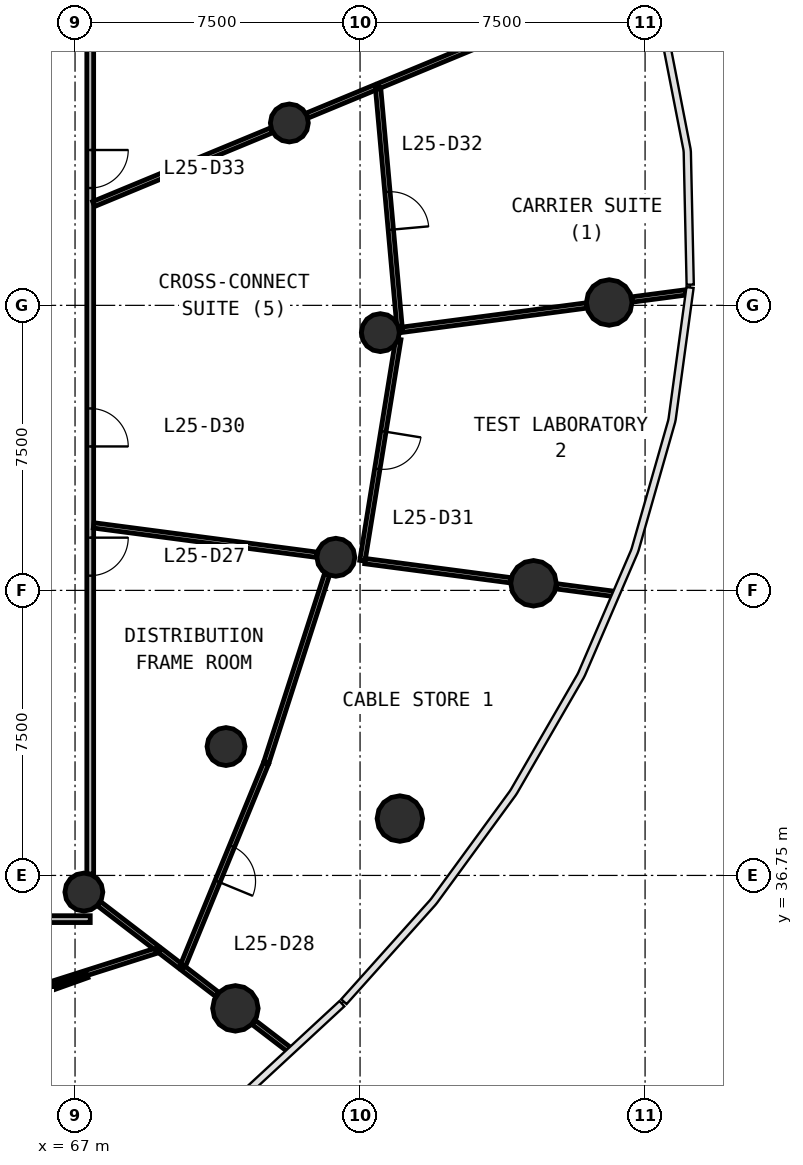
"""IFC4 building model, lengths in metres.
Left out: names, types, materials, properties, quantities, classifications, styles, units other than length and angle.
Written with IfcOpenShell. Run it as: python <this file> out.ifc"""

import sys

from ifc_helpers import new_model, si_unit, direction, frame, frame_2d, origin, origin_2d, place, context, subcontext, project, spatial, rectangle, circle, extrude, source, transform, mapped, element, fill, save


model = new_model("IFC4")
c1 = context("Model", 3, precision=1e-05, world=origin(), true_north=direction((0.0, 1.0)))
c2 = subcontext(c1, "Body", "Model", "MODEL_VIEW")
j1 = project(units=[si_unit("LENGTHUNIT", "METRE"), si_unit("PLANEANGLEUNIT", "RADIAN")], contexts=[c1])
p1 = place(None, origin())
s1 = spatial("IfcSite", under=j1, at=p1, CompositionType="ELEMENT")
p2 = place(p1, origin())
s2 = spatial("IfcBuilding", under=s1, at=p2, CompositionType="ELEMENT")
p3 = place(p2, frame((0.0, 0.0, 108.5)))
s3 = spatial("IfcBuildingStorey", under=s2, at=p3, CompositionType="ELEMENT", Elevation=108.5)
m1 = source(origin(), c2, "Body", "SweptSolid", [
    extrude(circle(Radius=0.6, at=origin_2d()), origin(), (0.0, 0.0, 1.0), 4.1),
])
for number, where, z_axis, x_axis in (
    (1, (81.056, 51.825, 0.0), (0.0, 0.0, 1.0), (1.0, 0.0, 0.0)),
    (2, (71.22, 33.252, 0.0), (0.0, 0.0, 1.0), (1.0, 0.0, 0.0)),
    (3, (75.548, 38.246, 0.0), (0.0, 0.0, 1.0), (1.0, 0.0, 0.0)),
    (4, (79.064, 44.437, 0.0), (0.0, 0.0, 1.0), (1.0, 0.0, 0.0)),
):
    element("IfcColumn", number, at=place(p3, frame(where, z_axis=z_axis, x_axis=x_axis)), inside=s3, PredefinedType="COLUMN", context=c2, shape_type="MappedRepresentation", body=[
        mapped(m1, transform((0.0, 0.0, 0.0), scale=1.0)),
    ])
m2 = source(origin(), c2, "Body", "SweptSolid", [
    extrude(circle(Radius=0.5, at=origin_2d()), origin(), (0.0, 0.0, 1.0), 4.1),
])
for number, where, z_axis, x_axis in (
    (5, (75.034, 51.032, 0.0), (0.0, 0.0, 1.0), (1.0, 0.0, 0.0)),
    (6, (72.639, 56.549, 0.0), (0.0, 0.0, 1.0), (1.0, 0.0, 0.0)),
    (7, (67.232, 36.312, 0.0), (0.0, 0.0, 1.0), (1.0, 0.0, 0.0)),
    (8, (70.972, 40.141, 0.0), (0.0, 0.0, 1.0), (1.0, 0.0, 0.0)),
    (9, (73.863, 45.122, 0.0), (0.0, 0.0, 1.0), (1.0, 0.0, 0.0)),
):
    element("IfcColumn", number, at=place(p3, frame(where, z_axis=z_axis, x_axis=x_axis)), inside=s3, PredefinedType="COLUMN", context=c2, shape_type="MappedRepresentation", body=[
        mapped(m2, transform((0.0, 0.0, 0.0), scale=1.0)),
    ])
p4 = place(p3, frame((67.4, 35.6, 0.0), z_axis=(0.0, 0.0, 1.0), x_axis=(-1.0, 0.0, 0.0)))
e10 = element("IfcWall", 10, at=p4, inside=s3, PredefinedType="PARTITIONING", context=c2, shape_type="SweptSolid", body=[
    extrude(rectangle(XDim=30.8, YDim=0.18, at=frame_2d((15.4, 0.0))), origin(), (0.0, 0.0, 1.0), 2.9),
])
p5 = place(p4, frame((9.05, 0.0, 0.0)))
e11 = element("IfcOpeningElement", 11, at=p5, cuts=e10, PredefinedType="OPENING", context=c2, shape_type="SweptSolid", body=[
    extrude(rectangle(XDim=0.9, YDim=2.1, at=frame_2d((0.45, 1.05))), frame((0.0, 0.1, 0.0), z_axis=(0.0, -1.0, 0.0), x_axis=(1.0, 0.0, 0.0)), (0.0, 0.0, 1.0), 0.2),
])
p6 = place(p4, frame((6.05, 0.0, 0.0)))
e12 = element("IfcOpeningElement", 12, at=p6, cuts=e10, PredefinedType="OPENING", context=c2, shape_type="SweptSolid", body=[
    extrude(rectangle(XDim=0.9, YDim=2.1, at=frame_2d((0.45, 1.05))), frame((0.0, 0.1, 0.0), z_axis=(0.0, -1.0, 0.0), x_axis=(1.0, 0.0, 0.0)), (0.0, 0.0, 1.0), 0.2),
])
p7 = place(p4, frame((2.45, 0.0, 0.0)))
e13 = element("IfcOpeningElement", 13, at=p7, cuts=e10, PredefinedType="OPENING", context=c2, shape_type="SweptSolid", body=[
    extrude(rectangle(XDim=0.9, YDim=2.1, at=frame_2d((0.45, 1.05))), frame((0.0, 0.1, 0.0), z_axis=(0.0, -1.0, 0.0), x_axis=(1.0, 0.0, 0.0)), (0.0, 0.0, 1.0), 0.2),
])
p8 = place(p4, frame((20.95, 0.0, 0.0)))
e14 = element("IfcOpeningElement", 14, at=p8, cuts=e10, PredefinedType="OPENING", context=c2, shape_type="SweptSolid", body=[
    extrude(rectangle(XDim=1.0, YDim=2.1, at=frame_2d((0.5, 1.05))), frame((0.0, 0.1, 0.0), z_axis=(0.0, -1.0, 0.0), x_axis=(1.0, 0.0, 0.0)), (0.0, 0.0, 1.0), 0.2),
])
p9 = place(p4, frame((14.95, 0.0, 0.0)))
e15 = element("IfcOpeningElement", 15, at=p9, cuts=e10, PredefinedType="OPENING", context=c2, shape_type="SweptSolid", body=[
    extrude(rectangle(XDim=1.0, YDim=2.1, at=frame_2d((0.5, 1.05))), frame((0.0, 0.1, 0.0), z_axis=(0.0, -1.0, 0.0), x_axis=(1.0, 0.0, 0.0)), (0.0, 0.0, 1.0), 0.2),
])
p10 = place(p4, frame((12.55, 0.0, 0.0)))
e16 = element("IfcOpeningElement", 16, at=p10, cuts=e10, PredefinedType="OPENING", context=c2, shape_type="SweptSolid", body=[
    extrude(rectangle(XDim=1.0, YDim=2.1, at=frame_2d((0.5, 1.05))), frame((0.0, 0.1, 0.0), z_axis=(0.0, -1.0, 0.0), x_axis=(1.0, 0.0, 0.0)), (0.0, 0.0, 1.0), 0.2),
])
p11 = place(p3, frame((67.4, 60.37, 0.0), z_axis=(0.0, 0.0, 1.0), x_axis=(0.0, -1.0, 0.0)))
e17 = element("IfcWall", 17, at=p11, inside=s3, PredefinedType="PARTITIONING", context=c2, shape_type="SweptSolid", body=[
    extrude(rectangle(XDim=23.583, YDim=0.18, at=frame_2d((11.791, 0.0))), origin(), (0.0, 0.0, 1.0), 2.9),
])
p12 = place(p11, frame((14.732, 0.0, 0.0)))
e18 = element("IfcOpeningElement", 18, at=p12, cuts=e17, PredefinedType="OPENING", context=c2, shape_type="SweptSolid", body=[
    extrude(rectangle(XDim=1.0, YDim=2.1, at=frame_2d((0.5, 1.05))), frame((0.0, 0.1, 0.0), z_axis=(0.0, -1.0, 0.0), x_axis=(1.0, 0.0, 0.0)), (0.0, 0.0, 1.0), 0.2),
])
p13 = place(p11, frame((11.333, 0.0, 0.0)))
e19 = element("IfcOpeningElement", 19, at=p13, cuts=e17, PredefinedType="OPENING", context=c2, shape_type="SweptSolid", body=[
    extrude(rectangle(XDim=1.0, YDim=2.1, at=frame_2d((0.5, 1.05))), frame((0.0, 0.1, 0.0), z_axis=(0.0, -1.0, 0.0), x_axis=(1.0, 0.0, 0.0)), (0.0, 0.0, 1.0), 0.2),
])
p14 = place(p11, frame((4.532, 0.0, 0.0)))
e20 = element("IfcOpeningElement", 20, at=p14, cuts=e17, PredefinedType="OPENING", context=c2, shape_type="SweptSolid", body=[
    extrude(rectangle(XDim=1.0, YDim=2.1, at=frame_2d((0.5, 1.05))), frame((0.0, 0.1, 0.0), z_axis=(0.0, -1.0, 0.0), x_axis=(1.0, 0.0, 0.0)), (0.0, 0.0, 1.0), 0.2),
])
p15 = place(p3, frame((74.97, 57.515, 0.0), z_axis=(0.0, 0.0, 1.0), x_axis=(0.089462467016, -0.995990194227, 0.0)))
e21 = element("IfcWall", 21, at=p15, inside=s3, PredefinedType="PARTITIONING", context=c2, shape_type="SweptSolid", body=[
    extrude(rectangle(XDim=6.44, YDim=0.14, at=frame_2d((3.22, 0.0))), origin(), (0.0, 0.0, 1.0), 2.9),
])
p16 = place(p15, frame((2.791, 0.0, 0.0)))
e22 = element("IfcOpeningElement", 22, at=p16, cuts=e21, PredefinedType="OPENING", context=c2, shape_type="SweptSolid", body=[
    extrude(rectangle(XDim=1.0, YDim=2.1, at=frame_2d((0.5, 1.05))), frame((0.0, 0.08, 0.0), z_axis=(0.0, -1.0, 0.0), x_axis=(1.0, 0.0, 0.0)), (0.0, 0.0, 1.0), 0.16),
])
p17 = place(p3, frame((67.49, 45.961, 0.0), z_axis=(0.0, 0.0, 1.0), x_axis=(0.991445034615, -0.130524876315, 0.0)))
e23 = element("IfcWall", 23, at=p17, inside=s3, PredefinedType="PARTITIONING", context=c2, shape_type="SweptSolid", body=[
    extrude(rectangle(XDim=5.924, YDim=0.14, at=frame_2d((2.962, 0.0))), origin(), (0.0, 0.0, 1.0), 2.9),
])
p18 = place(p3, frame((63.525, 32.98, 0.0), z_axis=(0.0, 0.0, 1.0), x_axis=(0.952796236259, 0.303610494172, 0.0)))
e24 = element("IfcWall", 24, at=p18, inside=s3, PredefinedType="PARTITIONING", context=c2, shape_type="SweptSolid", body=[
    extrude(rectangle(XDim=5.969, YDim=0.14, at=frame_2d((2.984, 0.0))), origin(), (0.0, 0.0, 1.0), 2.9),
])
p19 = place(p3, frame((75.507, 50.858, 0.0), z_axis=(0.0, 0.0, 1.0), x_axis=(-0.160052648202, -0.987108479248, 0.0)))
e25 = element("IfcWall", 25, at=p19, inside=s3, PredefinedType="PARTITIONING", context=c2, shape_type="SweptSolid", body=[
    extrude(rectangle(XDim=5.905, YDim=0.14, at=frame_2d((2.952, 0.0))), origin(), (0.0, 0.0, 1.0), 2.9),
])
p20 = place(p19, frame((2.455, 0.0, 0.0)))
e26 = element("IfcOpeningElement", 26, at=p20, cuts=e25, PredefinedType="OPENING", context=c2, shape_type="SweptSolid", body=[
    extrude(rectangle(XDim=1.0, YDim=2.1, at=frame_2d((0.5, 1.05))), frame((0.0, 0.08, 0.0), z_axis=(0.0, -1.0, 0.0), x_axis=(1.0, 0.0, 0.0)), (0.0, 0.0, 1.0), 0.16),
])
p21 = place(p3, frame((72.028, 39.704, 0.0), z_axis=(0.0, 0.0, 1.0), x_axis=(-0.380042060719, -0.92496920602, 0.0)))
e27 = element("IfcWall", 27, at=p21, inside=s3, PredefinedType="PARTITIONING", context=c2, shape_type="SweptSolid", body=[
    extrude(rectangle(XDim=5.813, YDim=0.14, at=frame_2d((2.907, 0.0))), origin(), (0.0, 0.0, 1.0), 2.9),
])
p22 = place(p21, frame((2.363, 0.0, 0.0)))
e28 = element("IfcOpeningElement", 28, at=p22, cuts=e27, PredefinedType="OPENING", context=c2, shape_type="SweptSolid", body=[
    extrude(rectangle(XDim=1.0, YDim=2.1, at=frame_2d((0.5, 1.05))), frame((0.0, 0.08, 0.0), z_axis=(0.0, -1.0, 0.0), x_axis=(1.0, 0.0, 0.0)), (0.0, 0.0, 1.0), 0.16),
])
p23 = place(p3, frame((74.998, 57.526, 0.0), z_axis=(0.0, 0.0, 1.0), x_axis=(0.923875965801, 0.382692043051, 0.0)))
e29 = element("IfcWall", 29, at=p23, inside=s3, PredefinedType="PARTITIONING", context=c2, shape_type="SweptSolid", body=[
    extrude(rectangle(XDim=5.302, YDim=0.14, at=frame_2d((2.651, 0.0))), origin(), (0.0, 0.0, 1.0), 2.9),
])
p24 = place(p3, frame((72.037, 39.733, 0.0), z_axis=(0.0, 0.0, 1.0), x_axis=(0.307028885335, 0.951700196265, 0.0)))
e30 = element("IfcWall", 30, at=p24, inside=s3, PredefinedType="PARTITIONING", context=c2, shape_type="SweptSolid", body=[
    extrude(rectangle(XDim=5.192, YDim=0.14, at=frame_2d((2.596, 0.0))), origin(), (0.0, 0.0, 1.0), 2.9),
])
p25 = place(p3, frame((67.49, 54.416, 0.0), z_axis=(0.0, 0.0, 1.0), x_axis=(0.923890025086, 0.382658100067, 0.0)))
e31 = element("IfcWall", 31, at=p25, inside=s3, PredefinedType="PARTITIONING", context=c2, shape_type="SweptSolid", body=[
    extrude(rectangle(XDim=5.068, YDim=0.14, at=frame_2d((2.534, 0.0))), origin(), (0.0, 0.0, 1.0), 2.9),
])
p26 = place(p3, frame((75.616, 51.109, 0.0), z_axis=(0.0, 0.0, 1.0), x_axis=(0.991441867731, 0.130548929177, 0.0)))
e32 = element("IfcWall", 32, at=p26, inside=s3, PredefinedType="PARTITIONING", context=c2, shape_type="SweptSolid", body=[
    extrude(rectangle(XDim=4.883, YDim=0.14, at=frame_2d((2.441, 0.0))), origin(), (0.0, 0.0, 1.0), 2.9),
])
p27 = place(p3, frame((74.632, 45.021, 0.0), z_axis=(0.0, 0.0, 1.0), x_axis=(0.991447632366, -0.130505142718, 0.0)))
e33 = element("IfcWall", 33, at=p27, inside=s3, PredefinedType="PARTITIONING", context=c2, shape_type="SweptSolid", body=[
    extrude(rectangle(XDim=3.867, YDim=0.14, at=frame_2d((1.933, 0.0))), origin(), (0.0, 0.0, 1.0), 2.9),
])
p28 = place(p3, frame((73.106, 56.742, 0.0), z_axis=(0.0, 0.0, 1.0), x_axis=(0.923843914347, 0.382769410904, 0.0)))
e34 = element("IfcWall", 34, at=p28, inside=s3, PredefinedType="PARTITIONING", context=c2, shape_type="SweptSolid", body=[
    extrude(rectangle(XDim=1.945, YDim=0.14, at=frame_2d((0.972, 0.0))), origin(), (0.0, 0.0, 1.0), 2.9),
])
p29 = place(p3, frame((67.633, 36.005, 0.0), z_axis=(0.0, 0.0, 1.0), x_axis=(0.79330932609, -0.608818785139, 0.0)))
e35 = element("IfcWall", 35, at=p29, inside=s3, PredefinedType="PARTITIONING", context=c2, shape_type="SweptSolid", body=[
    extrude(rectangle(XDim=1.906, YDim=0.14, at=frame_2d((0.953, 0.0))), origin(), (0.0, 0.0, 1.0), 2.9),
])
p30 = place(p3, frame((79.664, 44.358, 0.0), z_axis=(0.0, 0.0, 1.0), x_axis=(0.991447745975, -0.130504279629, 0.0)))
e36 = element("IfcWall", 36, at=p30, inside=s3, PredefinedType="PARTITIONING", context=c2, shape_type="SweptSolid", body=[
    extrude(rectangle(XDim=1.523, YDim=0.14, at=frame_2d((0.761, 0.0))), origin(), (0.0, 0.0, 1.0), 2.9),
])
p31 = place(p3, frame((81.656, 51.904, 0.0), z_axis=(0.0, 0.0, 1.0), x_axis=(0.991440859851, 0.130556583206, 0.0)))
e37 = element("IfcWall", 37, at=p31, inside=s3, PredefinedType="PARTITIONING", context=c2, shape_type="SweptSolid", body=[
    extrude(rectangle(XDim=1.423, YDim=0.14, at=frame_2d((0.711, 0.0))), origin(), (0.0, 0.0, 1.0), 2.9),
])
p32 = place(p3, frame((71.699, 32.884, 0.0), z_axis=(0.0, 0.0, 1.0), x_axis=(0.793332880396, -0.608788091935, 0.0)))
e38 = element("IfcWall", 38, at=p32, inside=s3, PredefinedType="PARTITIONING", context=c2, shape_type="SweptSolid", body=[
    extrude(rectangle(XDim=1.164, YDim=0.14, at=frame_2d((0.582, 0.0))), origin(), (0.0, 0.0, 1.0), 2.9),
])
p33 = place(p3, frame((69.843, 34.309, 0.0), z_axis=(0.0, 0.0, 1.0), x_axis=(0.793321446023, -0.608802992174, 0.0)))
e39 = element("IfcWall", 39, at=p33, inside=s3, PredefinedType="PARTITIONING", context=c2, shape_type="SweptSolid", body=[
    extrude(rectangle(XDim=1.131, YDim=0.14, at=frame_2d((0.566, 0.0))), origin(), (0.0, 0.0, 1.0), 2.9),
])
p34 = place(p3, frame((69.236, 34.774, 0.0), z_axis=(0.0, 0.0, 1.0), x_axis=(0.793363129336, -0.608748671465, 0.0)))
e40 = element("IfcWall", 40, at=p34, inside=s3, PredefinedType="PARTITIONING", context=c2, shape_type="SweptSolid", body=[
    extrude(rectangle(XDim=0.663, YDim=0.14, at=frame_2d((0.331, 0.0))), origin(), (0.0, 0.0, 1.0), 2.9),
])
p35 = place(p3, frame((65.363, 33.417, 0.0), z_axis=(0.0, 0.0, 1.0), x_axis=(0.941622213284, 0.336671364166, 0.0)))
e41 = element("IfcWall", 41, at=p35, inside=s3, PredefinedType="PARTITIONING", context=c2, shape_type="SweptSolid", body=[
    extrude(rectangle(XDim=2.078, YDim=0.12, at=frame_2d((1.039, 0.0))), origin(), (0.0, 0.0, 1.0), 2.9),
])
m3 = source(origin(), c2, "Body", "SweptSolid", [
    extrude(rectangle(XDim=1.0, YDim=2.1, at=frame_2d((0.5, 1.05))), frame((0.0, 0.025, 0.0), z_axis=(0.0, -1.0, 0.0), x_axis=(1.0, 0.0, 0.0)), (0.0, 0.0, 1.0), 0.05),
])
p36 = place(p12, origin())
e42 = element("IfcDoor", 42, at=p36, inside=s3, OperationType="SINGLE_SWING_LEFT", PredefinedType="DOOR", context=c2, shape_type="MappedRepresentation", body=[
    mapped(m3, transform((0.0, 0.0, 0.0), scale=1.0)),
])
fill(e18, e42)
p37 = place(p22, origin())
e43 = element("IfcDoor", 43, at=p37, inside=s3, OperationType="SINGLE_SWING_RIGHT", PredefinedType="DOOR", context=c2, shape_type="MappedRepresentation", body=[
    mapped(m3, transform((0.0, 0.0, 0.0), scale=1.0)),
])
fill(e28, e43)
p38 = place(p13, origin())
e44 = element("IfcDoor", 44, at=p38, inside=s3, OperationType="SINGLE_SWING_RIGHT", PredefinedType="DOOR", context=c2, shape_type="MappedRepresentation", body=[
    mapped(m3, transform((0.0, 0.0, 0.0), scale=1.0)),
])
fill(e19, e44)
p39 = place(p20, origin())
e45 = element("IfcDoor", 45, at=p39, inside=s3, OperationType="SINGLE_SWING_LEFT", PredefinedType="DOOR", context=c2, shape_type="MappedRepresentation", body=[
    mapped(m3, transform((0.0, 0.0, 0.0), scale=1.0)),
])
fill(e26, e45)
p40 = place(p16, origin())
e46 = element("IfcDoor", 46, at=p40, inside=s3, OperationType="SINGLE_SWING_RIGHT", PredefinedType="DOOR", context=c2, shape_type="MappedRepresentation", body=[
    mapped(m3, transform((0.0, 0.0, 0.0), scale=1.0)),
])
fill(e22, e46)
p41 = place(p14, origin())
e47 = element("IfcDoor", 47, at=p41, inside=s3, OperationType="SINGLE_SWING_LEFT", PredefinedType="DOOR", context=c2, shape_type="MappedRepresentation", body=[
    mapped(m3, transform((0.0, 0.0, 0.0), scale=1.0)),
])
fill(e20, e47)
save(model, sys.argv[1])
